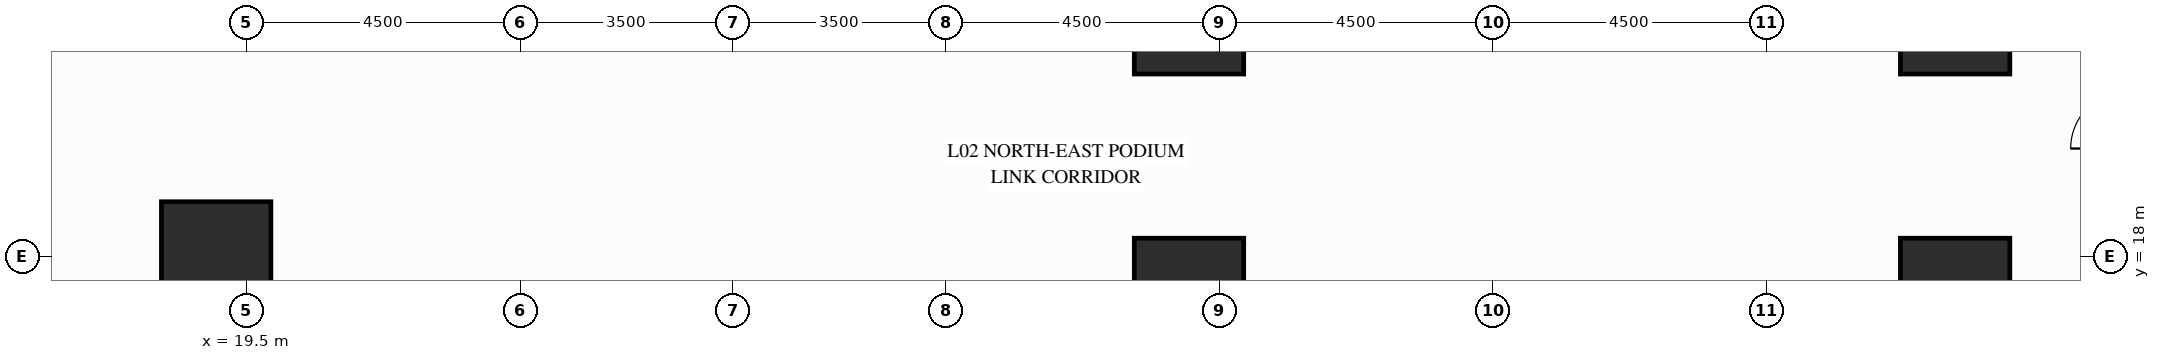
"""IFC4 building model, lengths in metres.
Left out: names, types, materials, properties, quantities, classifications, styles, units other than length and angle.
Written with IfcOpenShell. Run it as: python <this file> out.ifc"""

import sys

from ifc_helpers import new_model, si_unit, direction, frame, origin, origin_2d, place, context, subcontext, project, spatial, rectangle, extrude, source, transform, mapped, element, save


model = new_model("IFC4")
c1 = context("Model", 3, precision=1e-05, world=origin(), true_north=direction((0.0, 1.0)))
c2 = subcontext(c1, "Body", "Model", "MODEL_VIEW")
j1 = project(units=[si_unit("LENGTHUNIT", "METRE"), si_unit("PLANEANGLEUNIT", "RADIAN")], contexts=[c1])
p1 = place(None, origin())
s1 = spatial("IfcSite", under=j1, at=p1, CompositionType="ELEMENT")
p2 = place(p1, origin())
s2 = spatial("IfcBuilding", under=s1, at=p2, CompositionType="ELEMENT")
p3 = place(p2, frame((0.0, 0.0, 9.0)))
s3 = spatial("IfcBuildingStorey", under=s2, at=p3, CompositionType="ELEMENT", Elevation=9.0)
m1 = source(origin(), c2, "Body", "SweptSolid", [
    extrude(rectangle(XDim=1.8, YDim=1.8, at=origin_2d()), origin(), (0.0, 0.0, 1.0), 4.25),
])
for number, where, z_axis, x_axis in (
    (1, (47.6, 17.4, 0.0), (0.0, 0.0, 1.0), (1.0, 0.0, 0.0)),
    (2, (47.6, 21.9, 0.0), (0.0, 0.0, 1.0), (1.0, 0.0, 0.0)),
    (3, (19.0, 18.0, 0.0), (0.0, 0.0, 1.0), (1.0, 0.0, 0.0)),
    (4, (35.0, 17.4, 0.0), (0.0, 0.0, 1.0), (1.0, 0.0, 0.0)),
    (5, (35.0, 21.9, 0.0), (0.0, 0.0, 1.0), (1.0, 0.0, 0.0)),
):
    element("IfcColumn", number, at=place(p3, frame(where, z_axis=z_axis, x_axis=x_axis)), inside=s3, PredefinedType="COLUMN", context=c2, shape_type="MappedRepresentation", body=[
        mapped(m1, transform((0.0, 0.0, 0.0), x_axis=(1.0, 0.0, 0.0), y_axis=(0.0, 1.0, 0.0), z_axis=(0.0, 0.0, 1.0))),
    ])
save(model, sys.argv[1])
